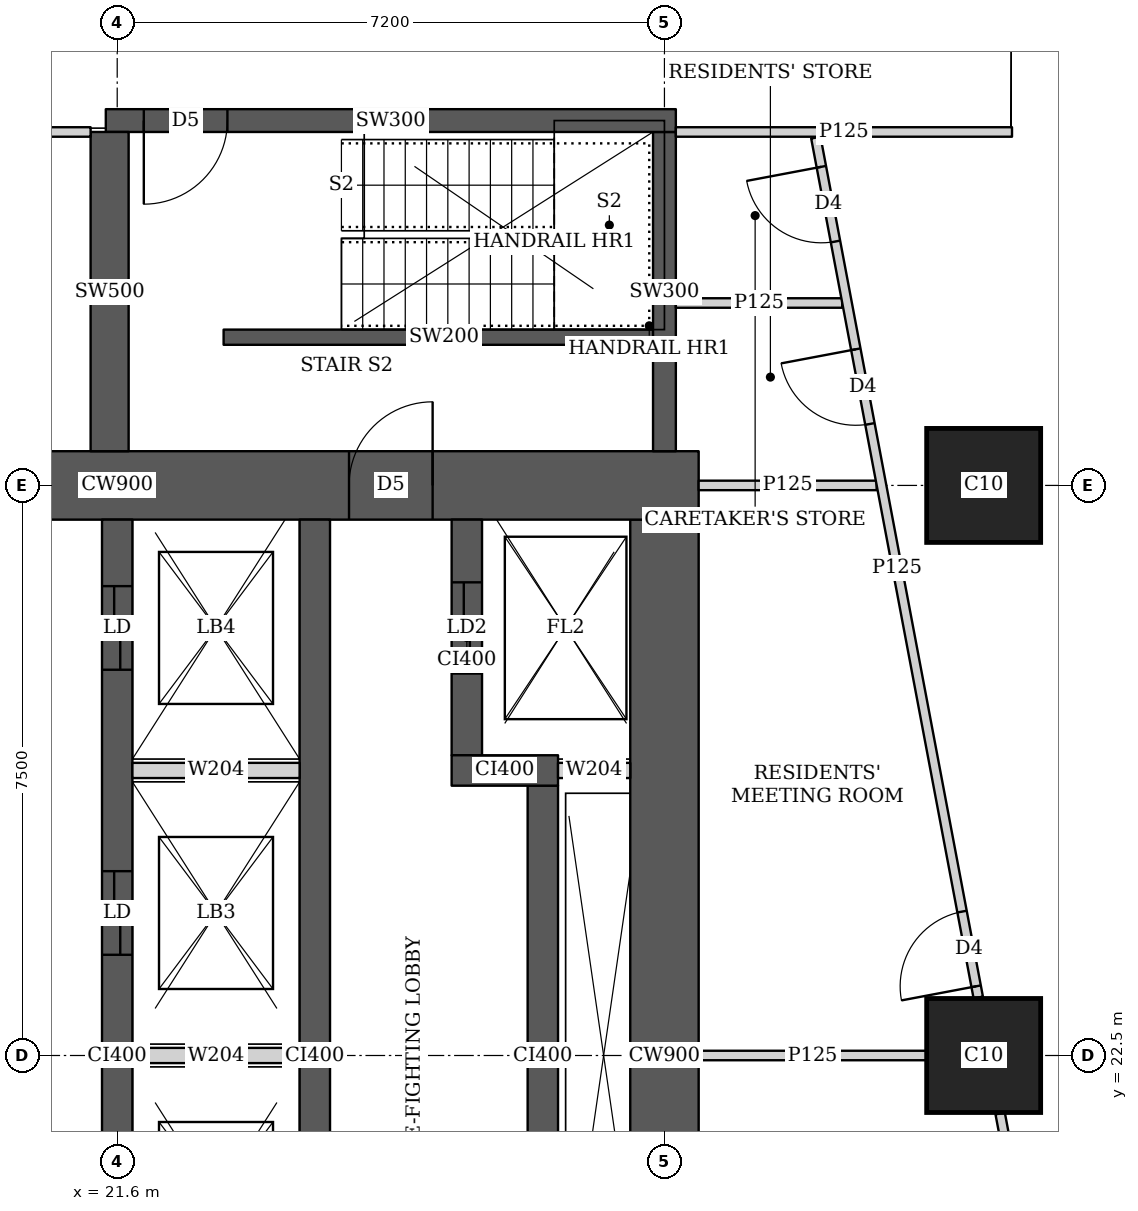
"""IFC4 building model, lengths in metres.
Left out: names, types, materials, properties, quantities, classifications, styles, units other than length and angle.
Written with IfcOpenShell. Run it as: python <this file> out.ifc"""

import sys

from ifc_helpers import new_model, si_unit, direction, frame, frame_2d, origin, origin_2d, place, context, subcontext, project, spatial, rectangle, extrude, element, fill, save


model = new_model("IFC4")
c1 = context("Model", 3, precision=1e-05, world=origin(), true_north=direction((0.0, 1.0)))
c2 = subcontext(c1, "Body", "Model", "MODEL_VIEW")
j1 = project(units=[si_unit("LENGTHUNIT", "METRE"), si_unit("PLANEANGLEUNIT", "RADIAN")], contexts=[c1])
p1 = place(None, origin())
s1 = spatial("IfcSite", under=j1, at=p1, CompositionType="ELEMENT")
p2 = place(p1, origin())
s2 = spatial("IfcBuilding", under=s1, at=p2, CompositionType="ELEMENT")
p3 = place(p2, frame((0.0, 0.0, 184.55)))
s3 = spatial("IfcBuildingStorey", under=s2, at=p3, CompositionType="ELEMENT", Elevation=184.55)
for number, where, z_axis, x_axis in (
    (1, (33.0, 22.5, 0.0), (0.0, 0.0, 1.0), (1.0, 0.0, 0.0)),
    (2, (33.0, 30.0, 0.0), (0.0, 0.0, 1.0), (1.0, 0.0, 0.0)),
):
    element("IfcColumn", number, at=place(p3, frame(where, z_axis=z_axis, x_axis=x_axis)), inside=s3, PredefinedType="COLUMN", context=c2, shape_type="SweptSolid", body=[
        extrude(rectangle(XDim=1.5, YDim=1.5, at=origin_2d()), origin(), (0.0, 0.0, 1.0), 3.75),
    ])
p4 = place(p3, frame((13.95, 30.0, 0.0), z_axis=(0.0, 0.0, 1.0), x_axis=(1.0, 0.0, 0.0)))
e3 = element("IfcWall", 3, at=p4, inside=s3, PredefinedType="SHEAR", context=c2, shape_type="SweptSolid", body=[
    extrude(rectangle(XDim=15.3, YDim=0.9, at=frame_2d((7.65, 0.0))), origin(), (0.0, 0.0, 1.0), 3.75),
])
p5 = place(p4, frame((4.45, 0.0, 0.0)))
e4 = element("IfcOpeningElement", 4, at=p5, cuts=e3, PredefinedType="OPENING", context=c2, shape_type="SweptSolid", body=[
    extrude(rectangle(XDim=1.8, YDim=2.1, at=frame_2d((0.9, 1.05))), frame((0.0, 0.46, 0.0), z_axis=(0.0, -1.0, 0.0), x_axis=(1.0, 0.0, 0.0)), (0.0, 0.0, 1.0), 0.92),
])
p6 = place(p4, frame((10.7, 0.0, 0.0)))
e5 = element("IfcOpeningElement", 5, at=p6, cuts=e3, PredefinedType="OPENING", context=c2, shape_type="SweptSolid", body=[
    extrude(rectangle(XDim=1.1, YDim=2.1, at=frame_2d((0.55, 1.05))), frame((0.0, 0.46, 0.0), z_axis=(0.0, -1.0, 0.0), x_axis=(1.0, 0.0, 0.0)), (0.0, 0.0, 1.0), 0.92),
])
p7 = place(p3, frame((28.8, 15.45, 0.0), z_axis=(0.0, 0.0, 1.0), x_axis=(0.0, 1.0, 0.0)))
e6 = element("IfcWall", 6, at=p7, inside=s3, PredefinedType="SHEAR", context=c2, shape_type="SweptSolid", body=[
    extrude(rectangle(XDim=14.1, YDim=0.9, at=frame_2d((7.05, 0.0))), origin(), (0.0, 0.0, 1.0), 3.75),
])
p8 = place(p3, frame((21.6, 15.45, 0.0), z_axis=(0.0, 0.0, 1.0), x_axis=(0.0, 1.0, 0.0)))
e7 = element("IfcWall", 7, at=p8, inside=s3, PredefinedType="SHEAR", context=c2, shape_type="SweptSolid", body=[
    extrude(rectangle(XDim=14.1, YDim=0.4, at=frame_2d((7.05, 0.0))), origin(), (0.0, 0.0, 1.0), 3.75),
])
p9 = place(p8, frame((0.875, 0.0, 0.0)))
e8 = element("IfcOpeningElement", 8, at=p9, cuts=e7, PredefinedType="OPENING", context=c2, shape_type="SweptSolid", body=[
    extrude(rectangle(XDim=1.1, YDim=2.1, at=frame_2d((0.55, 1.05))), frame((0.0, 0.21, 0.0), z_axis=(0.0, -1.0, 0.0), x_axis=(1.0, 0.0, 0.0)), (0.0, 0.0, 1.0), 0.42),
])
p10 = place(p8, frame((4.625, 0.0, 0.0)))
e9 = element("IfcOpeningElement", 9, at=p10, cuts=e7, PredefinedType="OPENING", context=c2, shape_type="SweptSolid", body=[
    extrude(rectangle(XDim=1.1, YDim=2.1, at=frame_2d((0.55, 1.05))), frame((0.0, 0.21, 0.0), z_axis=(0.0, -1.0, 0.0), x_axis=(1.0, 0.0, 0.0)), (0.0, 0.0, 1.0), 0.42),
])
p11 = place(p8, frame((8.375, 0.0, 0.0)))
e10 = element("IfcOpeningElement", 10, at=p11, cuts=e7, PredefinedType="OPENING", context=c2, shape_type="SweptSolid", body=[
    extrude(rectangle(XDim=1.1, YDim=2.1, at=frame_2d((0.55, 1.05))), frame((0.0, 0.21, 0.0), z_axis=(0.0, -1.0, 0.0), x_axis=(1.0, 0.0, 0.0)), (0.0, 0.0, 1.0), 0.42),
])
p12 = place(p8, frame((12.125, 0.0, 0.0)))
e11 = element("IfcOpeningElement", 11, at=p12, cuts=e7, PredefinedType="OPENING", context=c2, shape_type="SweptSolid", body=[
    extrude(rectangle(XDim=1.1, YDim=2.1, at=frame_2d((0.55, 1.05))), frame((0.0, 0.21, 0.0), z_axis=(0.0, -1.0, 0.0), x_axis=(1.0, 0.0, 0.0)), (0.0, 0.0, 1.0), 0.42),
])
p13 = place(p3, frame((24.2, 15.45, 0.0), z_axis=(0.0, 0.0, 1.0), x_axis=(0.0, 1.0, 0.0)))
e12 = element("IfcWall", 12, at=p13, inside=s3, PredefinedType="SHEAR", context=c2, shape_type="SweptSolid", body=[
    extrude(rectangle(XDim=14.1, YDim=0.4, at=frame_2d((7.05, 0.0))), origin(), (0.0, 0.0, 1.0), 3.75),
])
p14 = place(p3, frame((27.2, 18.95, 0.0), z_axis=(0.0, 0.0, 1.0), x_axis=(0.0, 1.0, 0.0)))
e13 = element("IfcWall", 13, at=p14, inside=s3, PredefinedType="SHEAR", context=c2, shape_type="SweptSolid", body=[
    extrude(rectangle(XDim=7.1, YDim=0.4, at=frame_2d((3.55, 0.0))), origin(), (0.0, 0.0, 1.0), 3.75),
])
p15 = place(p3, frame((26.0, 26.25, 0.0), z_axis=(0.0, 0.0, 1.0), x_axis=(1.0, 0.0, 0.0)))
e14 = element("IfcWall", 14, at=p15, inside=s3, PredefinedType="SHEAR", context=c2, shape_type="SweptSolid", body=[
    extrude(rectangle(XDim=1.4, YDim=0.4, at=frame_2d((0.7, 0.0))), origin(), (0.0, 0.0, 1.0), 3.75),
])
p16 = place(p3, frame((26.2, 26.45, 0.0), z_axis=(0.0, 0.0, 1.0), x_axis=(0.0, 1.0, 0.0)))
e15 = element("IfcWall", 15, at=p16, inside=s3, PredefinedType="SHEAR", context=c2, shape_type="SweptSolid", body=[
    extrude(rectangle(XDim=3.1, YDim=0.4, at=frame_2d((1.55, 0.0))), origin(), (0.0, 0.0, 1.0), 3.75),
])
p17 = place(p16, frame((1.075, 0.0, 0.0)))
e16 = element("IfcOpeningElement", 16, at=p17, cuts=e15, PredefinedType="OPENING", context=c2, shape_type="SweptSolid", body=[
    extrude(rectangle(XDim=1.2, YDim=2.1, at=frame_2d((0.6, 1.05))), frame((0.0, 0.21, 0.0), z_axis=(0.0, -1.0, 0.0), x_axis=(1.0, 0.0, 0.0)), (0.0, 0.0, 1.0), 0.42),
])
p18 = place(p3, frame((21.45, 34.8, 0.0), z_axis=(0.0, 0.0, 1.0), x_axis=(1.0, 0.0, 0.0)))
e17 = element("IfcWall", 17, at=p18, inside=s3, PredefinedType="SHEAR", context=c2, shape_type="SweptSolid", body=[
    extrude(rectangle(XDim=7.5, YDim=0.3, at=frame_2d((3.75, 0.0))), origin(), (0.0, 0.0, 1.0), 3.75),
])
p19 = place(p18, frame((0.5, 0.0, 0.0)))
e18 = element("IfcOpeningElement", 18, at=p19, cuts=e17, PredefinedType="OPENING", context=c2, shape_type="SweptSolid", body=[
    extrude(rectangle(XDim=1.1, YDim=2.1, at=frame_2d((0.55, 1.05))), frame((0.0, 0.16, 0.0), z_axis=(0.0, -1.0, 0.0), x_axis=(1.0, 0.0, 0.0)), (0.0, 0.0, 1.0), 0.32),
])
p20 = place(p3, frame((21.5, 30.45, 0.0), z_axis=(0.0, 0.0, 1.0), x_axis=(0.0, 1.0, 0.0)))
e19 = element("IfcWall", 19, at=p20, inside=s3, PredefinedType="SHEAR", context=c2, shape_type="SweptSolid", body=[
    extrude(rectangle(XDim=4.2, YDim=0.5, at=frame_2d((2.1, 0.0))), origin(), (0.0, 0.0, 1.0), 3.75),
])
p21 = place(p3, frame((28.8, 30.45, 0.0), z_axis=(0.0, 0.0, 1.0), x_axis=(0.0, 1.0, 0.0)))
e20 = element("IfcWall", 20, at=p21, inside=s3, PredefinedType="SHEAR", context=c2, shape_type="SweptSolid", body=[
    extrude(rectangle(XDim=4.2, YDim=0.3, at=frame_2d((2.1, 0.0))), origin(), (0.0, 0.0, 1.0), 3.75),
])
p22 = place(p3, frame((33.623, 43.022, 0.0), z_axis=(0.0, 0.0, 1.0), x_axis=(0.185596841028, -0.98262597798, 0.0)))
e21 = element("IfcWall", 21, at=p22, inside=s3, PredefinedType="SOLIDWALL", context=c2, shape_type="SweptSolid", body=[
    extrude(rectangle(XDim=41.66, YDim=0.15, at=frame_2d((20.83, 0.0))), origin(), (0.0, 0.0, 1.0), 2.45),
])
p23 = place(p22, frame((8.034, 0.0, 0.0)))
e22 = element("IfcOpeningElement", 22, at=p23, cuts=e21, PredefinedType="OPENING", context=c2, shape_type="SweptSolid", body=[
    extrude(rectangle(XDim=1.0, YDim=2.1, at=frame_2d((0.5, 1.05))), frame((0.0, 0.085, 0.0), z_axis=(0.0, -1.0, 0.0), x_axis=(1.0, 0.0, 0.0)), (0.0, 0.0, 1.0), 0.17),
])
p24 = place(p22, frame((12.611, 0.0, 0.0)))
e23 = element("IfcOpeningElement", 23, at=p24, cuts=e21, PredefinedType="OPENING", context=c2, shape_type="SweptSolid", body=[
    extrude(rectangle(XDim=1.0, YDim=2.1, at=frame_2d((0.5, 1.05))), frame((0.0, 0.085, 0.0), z_axis=(0.0, -1.0, 0.0), x_axis=(1.0, 0.0, 0.0)), (0.0, 0.0, 1.0), 0.17),
])
p25 = place(p22, frame((20.242, 0.0, 0.0)))
e24 = element("IfcOpeningElement", 24, at=p25, cuts=e21, PredefinedType="OPENING", context=c2, shape_type="SweptSolid", body=[
    extrude(rectangle(XDim=1.0, YDim=2.1, at=frame_2d((0.5, 1.05))), frame((0.0, 0.085, 0.0), z_axis=(0.0, -1.0, 0.0), x_axis=(1.0, 0.0, 0.0)), (0.0, 0.0, 1.0), 0.17),
])
p26 = place(p22, frame((31.206, 0.0, 0.0)))
e25 = element("IfcOpeningElement", 25, at=p26, cuts=e21, PredefinedType="OPENING", context=c2, shape_type="SweptSolid", body=[
    extrude(rectangle(XDim=1.0, YDim=2.1, at=frame_2d((0.5, 1.05))), frame((0.0, 0.085, 0.0), z_axis=(0.0, -1.0, 0.0), x_axis=(1.0, 0.0, 0.0)), (0.0, 0.0, 1.0), 0.17),
])
p27 = place(p3, frame((10.413, 34.65, 0.0), z_axis=(0.0, 0.0, 1.0), x_axis=(1.0, 0.0, 0.0)))
e26 = element("IfcWall", 26, at=p27, inside=s3, PredefinedType="PARTITIONING", context=c2, shape_type="SweptSolid", body=[
    extrude(rectangle(XDim=10.837, YDim=0.125, at=frame_2d((5.418, 0.0))), origin(), (0.0, 0.0, 1.0), 3.45),
])
p28 = place(p27, frame((7.487, 0.0, 0.0)))
e27 = element("IfcOpeningElement", 27, at=p28, cuts=e26, PredefinedType="OPENING", context=c2, shape_type="SweptSolid", body=[
    extrude(rectangle(XDim=1.8, YDim=2.1, at=frame_2d((0.9, 1.05))), frame((0.0, 0.073, 0.0), z_axis=(0.0, -1.0, 0.0), x_axis=(1.0, 0.0, 0.0)), (0.0, 0.0, 1.0), 0.145),
])
p29 = place(p3, frame((28.95, 34.65, 0.0), z_axis=(0.0, 0.0, 1.0), x_axis=(1.0, 0.0, 0.0)))
e28 = element("IfcWall", 28, at=p29, inside=s3, PredefinedType="PARTITIONING", context=c2, shape_type="SweptSolid", body=[
    extrude(rectangle(XDim=4.423, YDim=0.125, at=frame_2d((2.211, 0.0))), origin(), (0.0, 0.0, 1.0), 3.45),
])
p30 = place(p3, frame((35.354, 10.424, 0.0), z_axis=(0.0, 0.0, 1.0), x_axis=(-0.185612234763, 0.982623070311, 0.0)))
e29 = element("IfcWall", 29, at=p30, inside=s3, PredefinedType="PARTITIONING", context=c2, shape_type="SweptSolid", body=[
    extrude(rectangle(XDim=11.513, YDim=0.125, at=frame_2d((5.756, 0.0))), origin(), (0.0, 0.0, 1.0), 3.45),
])
p31 = place(p30, frame((0.697, 0.0, 0.0)))
e30 = element("IfcOpeningElement", 30, at=p31, cuts=e29, PredefinedType="OPENING", context=c2, shape_type="SweptSolid", body=[
    extrude(rectangle(XDim=1.0, YDim=2.1, at=frame_2d((0.5, 1.05))), frame((0.0, 0.073, 0.0), z_axis=(0.0, -1.0, 0.0), x_axis=(1.0, 0.0, 0.0)), (0.0, 0.0, 1.0), 0.145),
])
p32 = place(p3, frame((32.929, 23.263, 0.0), z_axis=(0.0, 0.0, 1.0), x_axis=(-0.185612234763, 0.982623070311, 0.0)))
e31 = element("IfcWall", 31, at=p32, inside=s3, PredefinedType="PARTITIONING", context=c2, shape_type="SweptSolid", body=[
    extrude(rectangle(XDim=11.513, YDim=0.125, at=frame_2d((5.756, 0.0))), origin(), (0.0, 0.0, 1.0), 3.45),
])
p33 = place(p32, frame((0.15, 0.0, 0.0)))
e32 = element("IfcOpeningElement", 32, at=p33, cuts=e31, PredefinedType="OPENING", context=c2, shape_type="SweptSolid", body=[
    extrude(rectangle(XDim=1.0, YDim=2.1, at=frame_2d((0.5, 1.05))), frame((0.0, 0.073, 0.0), z_axis=(0.0, -1.0, 0.0), x_axis=(1.0, 0.0, 0.0)), (0.0, 0.0, 1.0), 0.145),
])
p34 = place(p32, frame((7.679, 0.0, 0.0)))
e33 = element("IfcOpeningElement", 33, at=p34, cuts=e31, PredefinedType="OPENING", context=c2, shape_type="SweptSolid", body=[
    extrude(rectangle(XDim=1.0, YDim=2.1, at=frame_2d((0.5, 1.05))), frame((0.0, 0.073, 0.0), z_axis=(0.0, -1.0, 0.0), x_axis=(1.0, 0.0, 0.0)), (0.0, 0.0, 1.0), 0.145),
])
p35 = place(p32, frame((10.122, 0.0, 0.0)))
e34 = element("IfcOpeningElement", 34, at=p35, cuts=e31, PredefinedType="OPENING", context=c2, shape_type="SweptSolid", body=[
    extrude(rectangle(XDim=1.0, YDim=2.1, at=frame_2d((0.5, 1.05))), frame((0.0, 0.073, 0.0), z_axis=(0.0, -1.0, 0.0), x_axis=(1.0, 0.0, 0.0)), (0.0, 0.0, 1.0), 0.145),
])
p36 = place(p3, frame((29.25, 22.5, 0.0), z_axis=(0.0, 0.0, 1.0), x_axis=(1.0, 0.0, 0.0)))
e35 = element("IfcWall", 35, at=p36, inside=s3, PredefinedType="PARTITIONING", context=c2, shape_type="SweptSolid", body=[
    extrude(rectangle(XDim=2.999, YDim=0.125, at=frame_2d((1.5, 0.0))), origin(), (0.0, 0.0, 1.0), 3.45),
])
p37 = place(p3, frame((29.25, 30.0, 0.0), z_axis=(0.0, 0.0, 1.0), x_axis=(1.0, 0.0, 0.0)))
e36 = element("IfcWall", 36, at=p37, inside=s3, PredefinedType="PARTITIONING", context=c2, shape_type="SweptSolid", body=[
    extrude(rectangle(XDim=2.342, YDim=0.125, at=frame_2d((1.171, 0.0))), origin(), (0.0, 0.0, 1.0), 3.45),
])
p38 = place(p3, frame((28.95, 32.4, 0.0), z_axis=(0.0, 0.0, 1.0), x_axis=(1.0, 0.0, 0.0)))
e37 = element("IfcWall", 37, at=p38, inside=s3, PredefinedType="PARTITIONING", context=c2, shape_type="SweptSolid", body=[
    extrude(rectangle(XDim=2.189, YDim=0.125, at=frame_2d((1.094, 0.0))), origin(), (0.0, 0.0, 1.0), 3.45),
])
p39 = place(p3, frame((23.0, 31.95, 0.0), z_axis=(0.0, 0.0, 1.0), x_axis=(1.0, 0.0, 0.0)))
e38 = element("IfcWall", 38, at=p39, inside=s3, PredefinedType="SHEAR", context=c2, shape_type="SweptSolid", body=[
    extrude(rectangle(XDim=5.8, YDim=0.2, at=frame_2d((2.9, 0.0))), origin(), (0.0, 0.0, 1.0), 3.75),
])
for number, where, z_axis, x_axis in (
    (39, (21.8, 22.5, 0.0), (0.0, 0.0, 1.0), (1.0, 0.0, 0.0)),
    (40, (21.8, 26.25, 0.0), (0.0, 0.0, 1.0), (1.0, 0.0, 0.0)),
):
    element("IfcWall", number, at=place(p3, frame(where, z_axis=z_axis, x_axis=x_axis)), inside=s3, PredefinedType="SOLIDWALL", context=c2, shape_type="SweptSolid", body=[
        extrude(rectangle(XDim=2.2, YDim=0.2, at=frame_2d((1.1, 0.0))), origin(), (0.0, 0.0, 1.0), 3.45),
    ])
p40 = place(p3, frame((27.4, 26.25, 0.0), z_axis=(0.0, 0.0, 1.0), x_axis=(1.0, 0.0, 0.0)))
e41 = element("IfcWall", 41, at=p40, inside=s3, PredefinedType="SOLIDWALL", context=c2, shape_type="SweptSolid", body=[
    extrude(rectangle(XDim=0.95, YDim=0.2, at=frame_2d((0.475, 0.0))), origin(), (0.0, 0.0, 1.0), 3.45),
])
p41 = place(p33, origin())
e42 = element("IfcDoor", 42, at=p41, inside=s3, OperationType="SINGLE_SWING_LEFT", PredefinedType="DOOR", context=c2, shape_type="SweptSolid", body=[
    extrude(rectangle(XDim=1.0, YDim=2.1, at=frame_2d((0.5, 1.05))), frame((0.0, 0.025, 0.0), z_axis=(0.0, -1.0, 0.0), x_axis=(1.0, 0.0, 0.0)), (0.0, 0.0, 1.0), 0.05),
])
fill(e32, e42)
p42 = place(p34, origin())
e43 = element("IfcDoor", 43, at=p42, inside=s3, OperationType="SINGLE_SWING_RIGHT", PredefinedType="DOOR", context=c2, shape_type="SweptSolid", body=[
    extrude(rectangle(XDim=1.0, YDim=2.1, at=frame_2d((0.5, 1.05))), frame((0.0, 0.025, 0.0), z_axis=(0.0, -1.0, 0.0), x_axis=(1.0, 0.0, 0.0)), (0.0, 0.0, 1.0), 0.05),
])
fill(e33, e43)
p43 = place(p35, origin())
e44 = element("IfcDoor", 44, at=p43, inside=s3, OperationType="SINGLE_SWING_RIGHT", PredefinedType="DOOR", context=c2, shape_type="SweptSolid", body=[
    extrude(rectangle(XDim=1.0, YDim=2.1, at=frame_2d((0.5, 1.05))), frame((0.0, 0.025, 0.0), z_axis=(0.0, -1.0, 0.0), x_axis=(1.0, 0.0, 0.0)), (0.0, 0.0, 1.0), 0.05),
])
fill(e34, e44)
p44 = place(p6, origin())
e45 = element("IfcDoor", 45, at=p44, inside=s3, OperationType="SINGLE_SWING_RIGHT", PredefinedType="DOOR", context=c2, shape_type="SweptSolid", body=[
    extrude(rectangle(XDim=1.1, YDim=2.1, at=frame_2d((0.55, 1.05))), frame((0.0, 0.025, 0.0), z_axis=(0.0, -1.0, 0.0), x_axis=(1.0, 0.0, 0.0)), (0.0, 0.0, 1.0), 0.05),
])
fill(e5, e45)
p45 = place(p17, origin())
e46 = element("IfcDoor", 46, at=p45, inside=s3, OperationType="DOUBLE_DOOR_SLIDING", PredefinedType="DOOR", context=c2, shape_type="SweptSolid", body=[
    extrude(rectangle(XDim=1.2, YDim=2.1, at=frame_2d((0.6, 1.05))), frame((0.0, 0.025, 0.0), z_axis=(0.0, -1.0, 0.0), x_axis=(1.0, 0.0, 0.0)), (0.0, 0.0, 1.0), 0.05),
])
fill(e16, e46)
p46 = place(p11, origin())
e47 = element("IfcDoor", 47, at=p46, inside=s3, OperationType="DOUBLE_DOOR_SLIDING", PredefinedType="DOOR", context=c2, shape_type="SweptSolid", body=[
    extrude(rectangle(XDim=1.1, YDim=2.1, at=frame_2d((0.55, 1.05))), frame((0.0, 0.025, 0.0), z_axis=(0.0, -1.0, 0.0), x_axis=(1.0, 0.0, 0.0)), (0.0, 0.0, 1.0), 0.05),
])
fill(e10, e47)
p47 = place(p12, origin())
e48 = element("IfcDoor", 48, at=p47, inside=s3, OperationType="DOUBLE_DOOR_SLIDING", PredefinedType="DOOR", context=c2, shape_type="SweptSolid", body=[
    extrude(rectangle(XDim=1.1, YDim=2.1, at=frame_2d((0.55, 1.05))), frame((0.0, 0.025, 0.0), z_axis=(0.0, -1.0, 0.0), x_axis=(1.0, 0.0, 0.0)), (0.0, 0.0, 1.0), 0.05),
])
fill(e11, e48)
p48 = place(p19, origin())
e49 = element("IfcDoor", 49, at=p48, inside=s3, OperationType="SINGLE_SWING_RIGHT", PredefinedType="DOOR", context=c2, shape_type="SweptSolid", body=[
    extrude(rectangle(XDim=1.1, YDim=2.1, at=frame_2d((0.55, 1.05))), frame((0.0, 0.025, 0.0), z_axis=(0.0, -1.0, 0.0), x_axis=(1.0, 0.0, 0.0)), (0.0, 0.0, 1.0), 0.05),
])
fill(e18, e49)
save(model, sys.argv[1])
